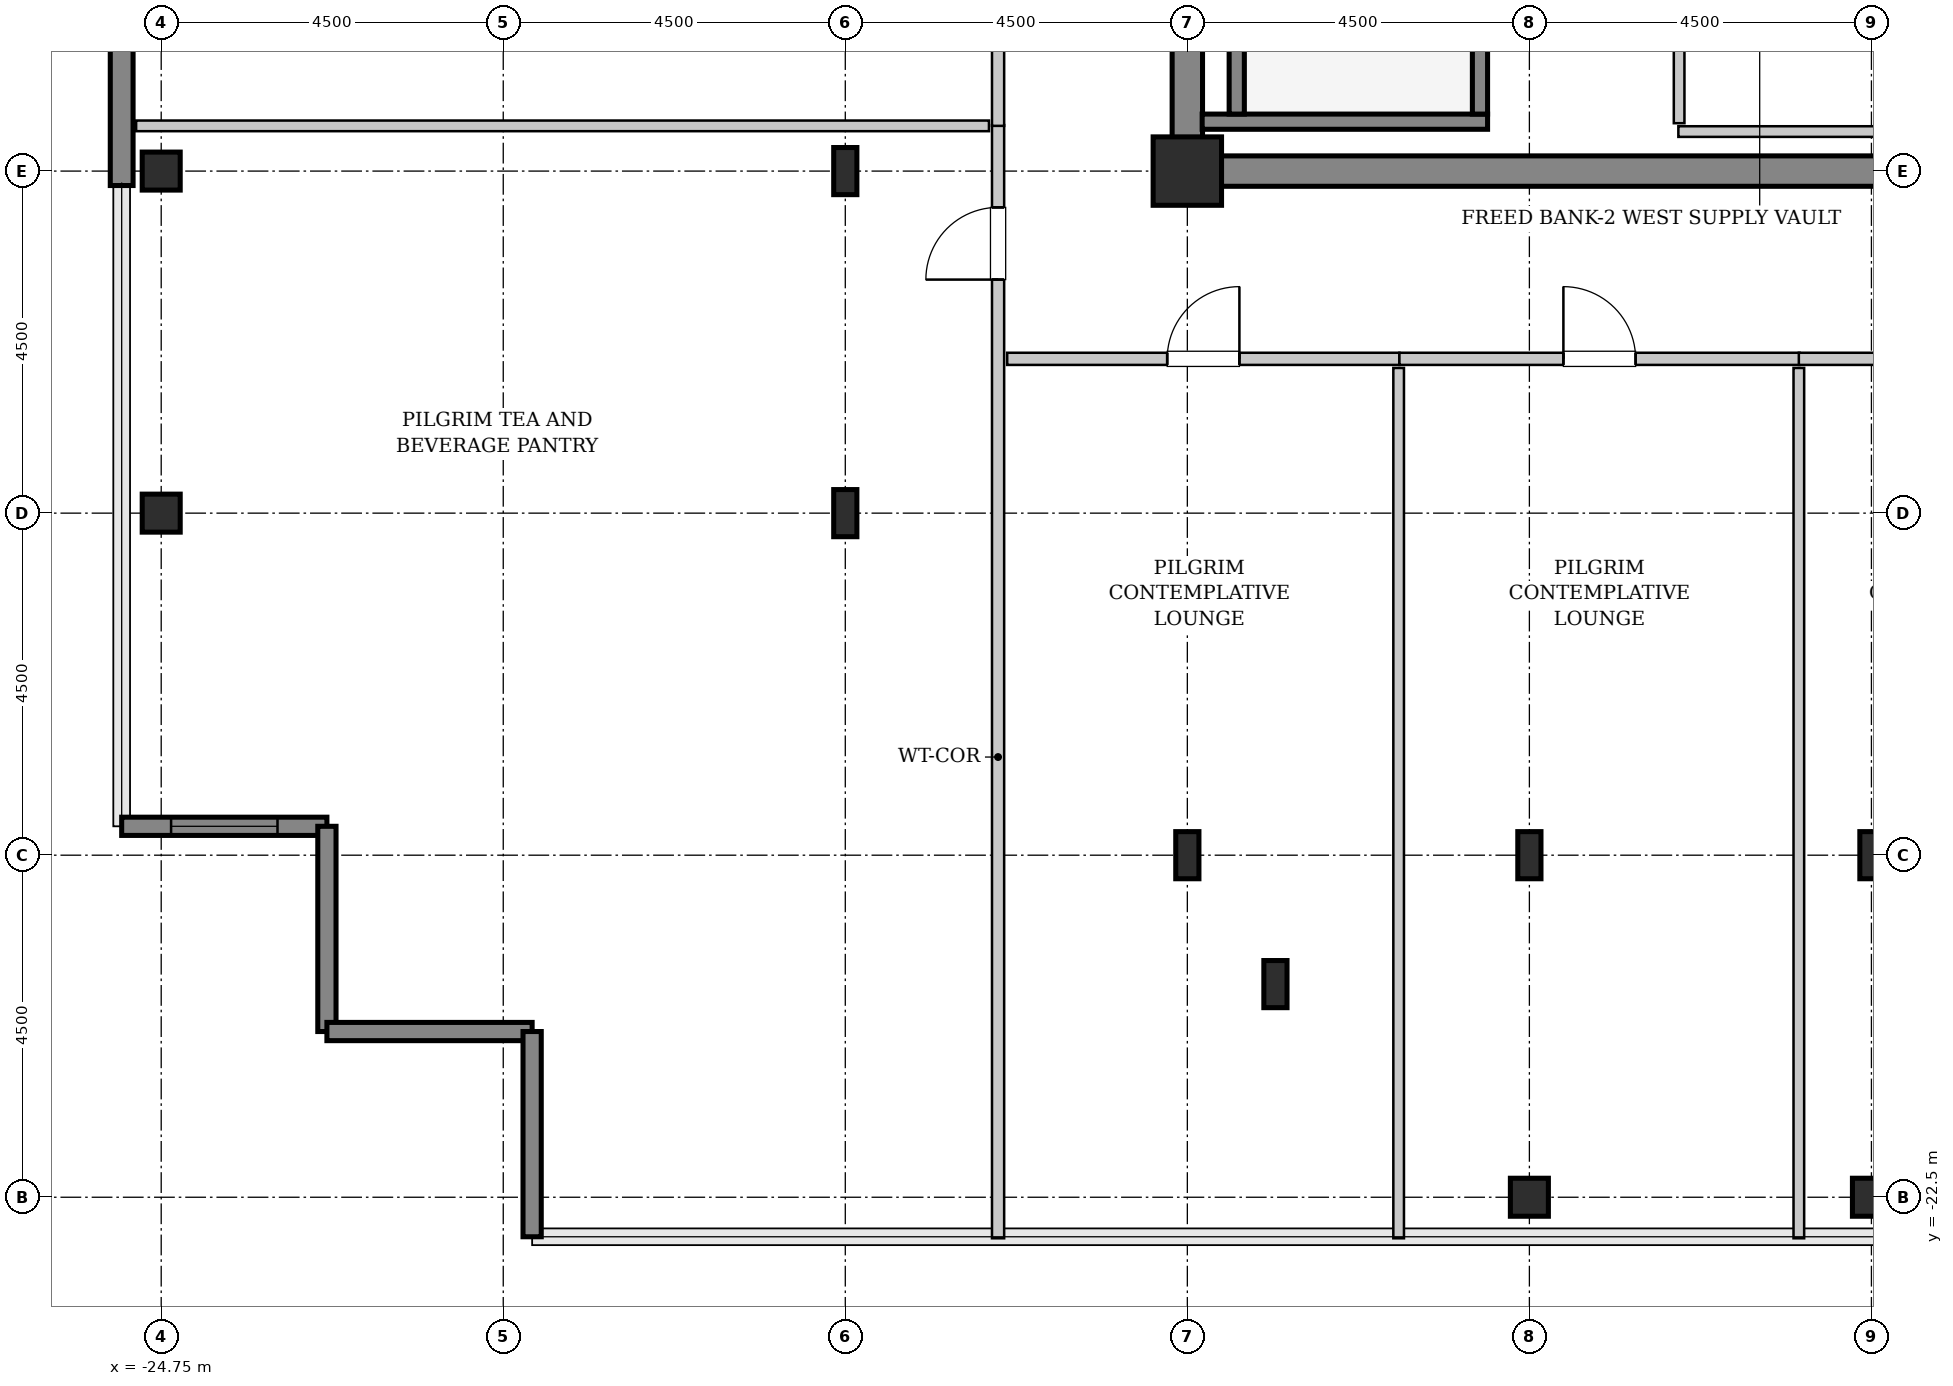
"""IFC4 building model, lengths in metres.
Left out: names, types, materials, properties, quantities, classifications, styles, units other than length and angle.
Written with IfcOpenShell. Run it as: python <this file> out.ifc"""

import sys

from ifc_helpers import new_model, si_unit, direction, frame, frame_2d, origin, origin_2d, place, context, subcontext, project, spatial, rectangle, hollow_rectangle, i_section, extrude, source, transform, mapped, element, fill, save


model = new_model("IFC4")
c1 = context("Model", 3, precision=1e-05, world=origin(), true_north=direction((0.0, 1.0)))
c2 = subcontext(c1, "Body", "Model", "MODEL_VIEW")
j1 = project(units=[si_unit("LENGTHUNIT", "METRE"), si_unit("PLANEANGLEUNIT", "RADIAN")], contexts=[c1])
p1 = place(None, origin())
s1 = spatial("IfcSite", under=j1, at=p1, CompositionType="ELEMENT")
p2 = place(p1, origin())
s2 = spatial("IfcBuilding", under=s1, at=p2, CompositionType="ELEMENT")
p3 = place(p2, frame((0.0, 0.0, 322.4)))
s3 = spatial("IfcBuildingStorey", under=s2, at=p3, CompositionType="ELEMENT", Elevation=322.4)
m1 = source(origin(), c2, "Body", "SweptSolid", [
    extrude(rectangle(XDim=9.9, YDim=0.4, at=frame_2d((4.95, 0.0))), origin(), (0.0, 0.0, 1.0), 3.8),
])
p4 = place(p3, frame((-11.45, -9.0, 0.0), z_axis=(0.0, 0.0, 1.0), x_axis=(1.0, 0.0, 0.0)))
e1 = element("IfcWall", 1, at=p4, inside=s3, PredefinedType="SHEAR", context=c2, shape_type="MappedRepresentation", body=[
    mapped(m1, transform((0.0, 0.0, 0.0), x_axis=(1.0, 0.0, 0.0), y_axis=(0.0, 1.0, 0.0), z_axis=(0.0, 0.0, 1.0), scale=1.0)),
])
m2 = source(origin(), c2, "Body", "SweptSolid", [
    extrude(rectangle(XDim=7.45, YDim=0.4, at=frame_2d((3.725, 0.0))), origin(), (0.0, 0.0, 1.0), 3.8),
])
p5 = place(p3, frame((-11.25, -8.8, 0.0), z_axis=(0.0, 0.0, 1.0), x_axis=(0.0, 1.0, 0.0)))
e2 = element("IfcWall", 2, at=p5, inside=s3, PredefinedType="SHEAR", context=c2, shape_type="MappedRepresentation", body=[
    mapped(m2, transform((0.0, 0.0, 0.0), x_axis=(1.0, 0.0, 0.0), y_axis=(0.0, 1.0, 0.0), z_axis=(0.0, 0.0, 1.0), scale=1.0)),
])
m3 = source(origin(), c2, "Body", "SweptSolid", [
    extrude(hollow_rectangle(XDim=0.5, YDim=0.5, WallThickness=0.025, InnerFilletRadius=0.025, OuterFilletRadius=0.05, at=origin_2d()), origin(), (0.0, 0.0, 1.0), 3.8),
])
for number, where, z_axis, x_axis in (
    (3, (-24.75, -13.5, 0.0), (0.0, 0.0, 1.0), (1.0, 0.0, 0.0)),
    (4, (-24.75, -9.0, 0.0), (0.0, 0.0, 1.0), (1.0, 0.0, 0.0)),
):
    element("IfcColumn", number, at=place(p3, frame(where, z_axis=z_axis, x_axis=x_axis)), inside=s3, PredefinedType="COLUMN", context=c2, shape_type="MappedRepresentation", body=[
        mapped(m3, transform((0.0, 0.0, 0.0), x_axis=(1.0, 0.0, 0.0), y_axis=(0.0, 1.0, 0.0), z_axis=(0.0, 0.0, 1.0), scale=1.0)),
    ])
m4 = source(origin(), c2, "Body", "SweptSolid", [
    extrude(i_section(OverallWidth=0.305, OverallDepth=0.62, WebThickness=0.021, FlangeThickness=0.04, FilletRadius=0.027, at=origin_2d()), origin(), (0.0, 0.0, 1.0), 3.8),
])
for number, where, z_axis, x_axis in (
    (5, (-15.75, -13.5, 0.0), (0.0, 0.0, 1.0), (1.0, 0.0, 0.0)),
    (6, (-15.75, -9.0, 0.0), (0.0, 0.0, 1.0), (1.0, 0.0, 0.0)),
    (7, (-11.25, -18.0, 0.0), (0.0, 0.0, 1.0), (1.0, 0.0, 0.0)),
):
    element("IfcColumn", number, at=place(p3, frame(where, z_axis=z_axis, x_axis=x_axis)), inside=s3, PredefinedType="COLUMN", context=c2, shape_type="MappedRepresentation", body=[
        mapped(m4, transform((0.0, 0.0, 0.0), x_axis=(1.0, 0.0, 0.0), y_axis=(0.0, 1.0, 0.0), z_axis=(0.0, 0.0, 1.0), scale=1.0)),
    ])
m5 = source(origin(), c2, "Body", "SweptSolid", [
    extrude(rectangle(XDim=0.9, YDim=0.9, at=origin_2d()), origin(), (0.0, 0.0, 1.0), 3.8),
])
p6 = place(p3, frame((-11.25, -9.0, 0.0), z_axis=(0.0, 0.0, 1.0), x_axis=(1.0, 0.0, 0.0)))
e8 = element("IfcColumn", 8, at=p6, inside=s3, PredefinedType="COLUMN", context=c2, shape_type="MappedRepresentation", body=[
    mapped(m5, transform((0.0, 0.0, 0.0), x_axis=(1.0, 0.0, 0.0), y_axis=(0.0, 1.0, 0.0), z_axis=(0.0, 0.0, 1.0), scale=1.0)),
])
p7 = place(p3, frame((-10.091, -19.696, 0.0), z_axis=(0.0, 0.0, 1.0), x_axis=(1.0, 0.0, 0.0)))
e9 = element("IfcColumn", 9, at=p7, inside=s3, PredefinedType="COLUMN", context=c2, shape_type="MappedRepresentation", body=[
    mapped(m4, transform((0.0, 0.0, 0.0), x_axis=(1.0, 0.0, 0.0), y_axis=(0.0, 1.0, 0.0), z_axis=(0.0, 0.0, 1.0), scale=1.0)),
])
p8 = place(p3, frame((-6.75, -22.5, 0.0), z_axis=(0.0, 0.0, 1.0), x_axis=(1.0, 0.0, 0.0)))
e10 = element("IfcColumn", 10, at=p8, inside=s3, PredefinedType="COLUMN", context=c2, shape_type="MappedRepresentation", body=[
    mapped(m3, transform((0.0, 0.0, 0.0), x_axis=(1.0, 0.0, 0.0), y_axis=(0.0, 1.0, 0.0), z_axis=(0.0, 0.0, 1.0), scale=1.0)),
])
p9 = place(p3, frame((-6.75, -18.0, 0.0), z_axis=(0.0, 0.0, 1.0), x_axis=(1.0, 0.0, 0.0)))
e11 = element("IfcColumn", 11, at=p9, inside=s3, PredefinedType="COLUMN", context=c2, shape_type="MappedRepresentation", body=[
    mapped(m4, transform((0.0, 0.0, 0.0), x_axis=(1.0, 0.0, 0.0), y_axis=(0.0, 1.0, 0.0), z_axis=(0.0, 0.0, 1.0), scale=1.0)),
])
p10 = place(p3, frame((-2.25, -22.5, 0.0), z_axis=(0.0, 0.0, 1.0), x_axis=(1.0, 0.0, 0.0)))
e12 = element("IfcColumn", 12, at=p10, inside=s3, PredefinedType="COLUMN", context=c2, shape_type="MappedRepresentation", body=[
    mapped(m3, transform((0.0, 0.0, 0.0), x_axis=(1.0, 0.0, 0.0), y_axis=(0.0, 1.0, 0.0), z_axis=(0.0, 0.0, 1.0), scale=1.0)),
])
p11 = place(p3, frame((-2.25, -18.0, 0.0), z_axis=(0.0, 0.0, 1.0), x_axis=(1.0, 0.0, 0.0)))
e13 = element("IfcColumn", 13, at=p11, inside=s3, PredefinedType="COLUMN", context=c2, shape_type="MappedRepresentation", body=[
    mapped(m4, transform((0.0, 0.0, 0.0), x_axis=(1.0, 0.0, 0.0), y_axis=(0.0, 1.0, 0.0), z_axis=(0.0, 0.0, 1.0), scale=1.0)),
])
m6 = source(origin(), c2, "Body", "SweptSolid", [
    extrude(rectangle(XDim=4.88, YDim=0.3, at=frame_2d((2.44, 0.0))), origin(), (0.0, 0.0, 1.0), 3.55),
])
p12 = place(p3, frame((-25.27, -9.19, 0.0), z_axis=(0.0, 0.0, 1.0), x_axis=(0.0, 1.0, 0.0)))
e14 = element("IfcWall", 14, at=p12, inside=s3, PredefinedType="SHEAR", context=c2, shape_type="MappedRepresentation", body=[
    mapped(m6, transform((0.0, 0.0, 0.0), x_axis=(1.0, 0.0, 0.0), y_axis=(0.0, 1.0, 0.0), z_axis=(0.0, 0.0, 1.0), scale=1.0)),
])
m7 = source(origin(), c2, "Body", "SweptSolid", [
    extrude(rectangle(XDim=2.7, YDim=0.24, at=frame_2d((1.35, 0.0))), origin(), (0.0, 0.0, 1.0), 3.55),
])
p13 = place(p3, frame((-25.27, -17.62, 0.0), z_axis=(0.0, 0.0, 1.0), x_axis=(1.0, 0.0, 0.0)))
e15 = element("IfcWall", 15, at=p13, inside=s3, PredefinedType="SHEAR", context=c2, shape_type="MappedRepresentation", body=[
    mapped(m7, transform((0.0, 0.0, 0.0), x_axis=(1.0, 0.0, 0.0), y_axis=(0.0, 1.0, 0.0), z_axis=(0.0, 0.0, 1.0), scale=1.0)),
])
p14 = place(p13, frame((0.65, 0.0, 0.85)))
e16 = element("IfcOpeningElement", 16, at=p14, cuts=e15, PredefinedType="OPENING", context=c2, shape_type="SweptSolid", body=[
    extrude(rectangle(XDim=1.4, YDim=1.8, at=frame_2d((0.7, 0.9))), frame((0.0, 0.13, 0.0), z_axis=(0.0, -1.0, 0.0), x_axis=(1.0, 0.0, 0.0)), (0.0, 0.0, 1.0), 0.26),
])
for number, where, z_axis, x_axis in (
    (17, (-22.57, -17.62, 0.0), (0.0, 0.0, 1.0), (0.0, -1.0, 0.0)),
    (18, (-22.57, -20.32, 0.0), (0.0, 0.0, 1.0), (1.0, 0.0, 0.0)),
    (19, (-19.87, -20.32, 0.0), (0.0, 0.0, 1.0), (0.0, -1.0, 0.0)),
):
    element("IfcWall", number, at=place(p3, frame(where, z_axis=z_axis, x_axis=x_axis)), inside=s3, PredefinedType="SHEAR", context=c2, shape_type="MappedRepresentation", body=[
        mapped(m7, transform((0.0, 0.0, 0.0), x_axis=(1.0, 0.0, 0.0), y_axis=(0.0, 1.0, 0.0), z_axis=(0.0, 0.0, 1.0), scale=1.0)),
    ])
m8 = source(origin(), c2, "Body", "SweptSolid", [
    extrude(rectangle(XDim=3.755, YDim=0.2, at=frame_2d((1.877, 0.0))), origin(), (0.0, 0.0, 1.0), 3.8),
])
p15 = place(p3, frame((-11.055, -8.35, 0.0), z_axis=(0.0, 0.0, 1.0), x_axis=(1.0, 0.0, 0.0)))
e20 = element("IfcWall", 20, at=p15, inside=s3, PredefinedType="SOLIDWALL", context=c2, shape_type="MappedRepresentation", body=[
    mapped(m8, transform((0.0, 0.0, 0.0), x_axis=(1.0, 0.0, 0.0), y_axis=(0.0, 1.0, 0.0), z_axis=(0.0, 0.0, 1.0), scale=1.0)),
])
m9 = source(origin(), c2, "Body", "SweptSolid", [
    extrude(rectangle(XDim=7.1, YDim=0.2, at=frame_2d((3.55, 0.0))), origin(), (0.0, 0.0, 1.0), 3.8),
])
p16 = place(p3, frame((-10.6, -1.15, 0.0), z_axis=(0.0, 0.0, 1.0), x_axis=(0.0, -1.0, 0.0)))
e21 = element("IfcWall", 21, at=p16, inside=s3, PredefinedType="SOLIDWALL", context=c2, shape_type="MappedRepresentation", body=[
    mapped(m9, transform((0.0, 0.0, 0.0), x_axis=(1.0, 0.0, 0.0), y_axis=(0.0, 1.0, 0.0), z_axis=(0.0, 0.0, 1.0), scale=1.0)),
])
p17 = place(p3, frame((-7.4, -1.15, 0.0), z_axis=(0.0, 0.0, 1.0), x_axis=(0.0, -1.0, 0.0)))
e22 = element("IfcWall", 22, at=p17, inside=s3, PredefinedType="SOLIDWALL", context=c2, shape_type="MappedRepresentation", body=[
    mapped(m9, transform((0.0, 0.0, 0.0), x_axis=(1.0, 0.0, 0.0), y_axis=(0.0, 1.0, 0.0), z_axis=(0.0, 0.0, 1.0), scale=1.0)),
])
p18 = place(p17, frame((0.18, 0.0, 0.0)))
e23 = element("IfcOpeningElement", 23, at=p18, cuts=e22, PredefinedType="OPENING", context=c2, shape_type="SweptSolid", body=[
    extrude(rectangle(XDim=1.1, YDim=2.15, at=frame_2d((0.55, 1.075))), frame((0.0, 0.11, 0.0), z_axis=(0.0, -1.0, 0.0), x_axis=(1.0, 0.0, 0.0)), (0.0, 0.0, 1.0), 0.22),
])
m10 = source(origin(), c2, "Body", "SweptSolid", [
    extrude(rectangle(XDim=3.15, YDim=0.14, at=frame_2d((1.575, 0.0))), origin(), (0.0, 0.0, 1.0), 3.535),
])
p19 = place(p3, frame((-4.79, -8.48, 0.0), z_axis=(0.0, 0.0, 1.0), x_axis=(1.0, 0.0, 0.0)))
e24 = element("IfcWall", 24, at=p19, inside=s3, PredefinedType="PARTITIONING", context=c2, shape_type="MappedRepresentation", body=[
    mapped(m10, transform((0.0, 0.0, 0.0), x_axis=(1.0, 0.0, 0.0), y_axis=(0.0, 1.0, 0.0), z_axis=(0.0, 0.0, 1.0), scale=1.0)),
])
m11 = source(origin(), c2, "Body", "SweptSolid", [
    extrude(rectangle(XDim=2.38, YDim=0.14, at=frame_2d((1.19, 0.0))), origin(), (0.0, 0.0, 1.0), 3.535),
])
p20 = place(p3, frame((-4.78, -8.37, 0.0), z_axis=(0.0, 0.0, 1.0), x_axis=(0.0, 1.0, 0.0)))
e25 = element("IfcWall", 25, at=p20, inside=s3, PredefinedType="PARTITIONING", context=c2, shape_type="MappedRepresentation", body=[
    mapped(m11, transform((0.0, 0.0, 0.0), x_axis=(1.0, 0.0, 0.0), y_axis=(0.0, 1.0, 0.0), z_axis=(0.0, 0.0, 1.0), scale=1.0)),
])
m12 = source(origin(), c2, "Body", "SweptSolid", [
    extrude(rectangle(XDim=14.645, YDim=0.16, at=frame_2d((7.323, 0.0))), origin(), (0.0, 0.0, 1.0), 3.535),
])
p21 = place(p3, frame((-13.74, -23.04, 0.0), z_axis=(0.0, 0.0, 1.0), x_axis=(0.0, 1.0, 0.0)))
e26 = element("IfcWall", 26, at=p21, inside=s3, PredefinedType="PARTITIONING", context=c2, shape_type="MappedRepresentation", body=[
    mapped(m12, transform((0.0, 0.0, 0.0), x_axis=(1.0, 0.0, 0.0), y_axis=(0.0, 1.0, 0.0), z_axis=(0.0, 0.0, 1.0), scale=1.0)),
])
p22 = place(p21, frame((12.613, 0.0, 0.0)))
e27 = element("IfcOpeningElement", 27, at=p22, cuts=e26, PredefinedType="OPENING", context=c2, shape_type="SweptSolid", body=[
    extrude(rectangle(XDim=0.95, YDim=2.1, at=frame_2d((0.475, 1.05))), frame((0.0, 0.09, 0.0), z_axis=(0.0, -1.0, 0.0), x_axis=(1.0, 0.0, 0.0)), (0.0, 0.0, 1.0), 0.18),
])
m13 = source(origin(), c2, "Body", "SweptSolid", [
    extrude(rectangle(XDim=11.22, YDim=0.14, at=frame_2d((5.61, 0.0))), origin(), (0.0, 0.0, 1.0), 3.535),
])
p23 = place(p3, frame((-25.08, -8.405, 0.0), z_axis=(0.0, 0.0, 1.0), x_axis=(1.0, 0.0, 0.0)))
e28 = element("IfcWall", 28, at=p23, inside=s3, PredefinedType="PARTITIONING", context=c2, shape_type="MappedRepresentation", body=[
    mapped(m13, transform((0.0, 0.0, 0.0), x_axis=(1.0, 0.0, 0.0), y_axis=(0.0, 1.0, 0.0), z_axis=(0.0, 0.0, 1.0), scale=1.0)),
])
m14 = source(origin(), c2, "Body", "SweptSolid", [
    extrude(rectangle(XDim=6.41, YDim=0.16, at=frame_2d((3.205, 0.0))), origin(), (0.0, 0.0, 1.0), 3.535),
])
p24 = place(p3, frame((-13.74, -8.405, 0.0), z_axis=(0.0, 0.0, 1.0), x_axis=(0.0, 1.0, 0.0)))
e29 = element("IfcWall", 29, at=p24, inside=s3, PredefinedType="PARTITIONING", context=c2, shape_type="MappedRepresentation", body=[
    mapped(m14, transform((0.0, 0.0, 0.0), x_axis=(1.0, 0.0, 0.0), y_axis=(0.0, 1.0, 0.0), z_axis=(0.0, 0.0, 1.0), scale=1.0)),
])
p25 = place(p24, frame((2.73, 0.0, 0.0)))
e30 = element("IfcOpeningElement", 30, at=p25, cuts=e29, PredefinedType="OPENING", context=c2, shape_type="SweptSolid", body=[
    extrude(rectangle(XDim=0.95, YDim=2.1, at=frame_2d((0.475, 1.05))), frame((0.0, 0.09, 0.0), z_axis=(0.0, -1.0, 0.0), x_axis=(1.0, 0.0, 0.0)), (0.0, 0.0, 1.0), 0.18),
])
m15 = source(origin(), c2, "Body", "SweptSolid", [
    extrude(rectangle(XDim=5.16, YDim=0.16, at=frame_2d((2.58, 0.0))), origin(), (0.0, 0.0, 1.0), 3.535),
])
p26 = place(p3, frame((-13.62, -11.47, 0.0), z_axis=(0.0, 0.0, 1.0), x_axis=(1.0, 0.0, 0.0)))
e31 = element("IfcWall", 31, at=p26, inside=s3, PredefinedType="PARTITIONING", context=c2, shape_type="MappedRepresentation", body=[
    mapped(m15, transform((0.0, 0.0, 0.0), x_axis=(1.0, 0.0, 0.0), y_axis=(0.0, 1.0, 0.0), z_axis=(0.0, 0.0, 1.0), scale=1.0)),
])
p27 = place(p26, frame((2.105, 0.0, 0.0)))
e32 = element("IfcOpeningElement", 32, at=p27, cuts=e31, PredefinedType="OPENING", context=c2, shape_type="SweptSolid", body=[
    extrude(rectangle(XDim=0.95, YDim=2.1, at=frame_2d((0.475, 1.05))), frame((0.0, 0.09, 0.0), z_axis=(0.0, -1.0, 0.0), x_axis=(1.0, 0.0, 0.0)), (0.0, 0.0, 1.0), 0.18),
])
m16 = source(origin(), c2, "Body", "SweptSolid", [
    extrude(rectangle(XDim=11.45, YDim=0.14, at=frame_2d((5.725, 0.0))), origin(), (0.0, 0.0, 1.0), 3.535),
])
p28 = place(p3, frame((-8.47, -23.04, 0.0), z_axis=(0.0, 0.0, 1.0), x_axis=(0.0, 1.0, 0.0)))
e33 = element("IfcWall", 33, at=p28, inside=s3, PredefinedType="PARTITIONING", context=c2, shape_type="MappedRepresentation", body=[
    mapped(m16, transform((0.0, 0.0, 0.0), x_axis=(1.0, 0.0, 0.0), y_axis=(0.0, 1.0, 0.0), z_axis=(0.0, 0.0, 1.0), scale=1.0)),
])
m17 = source(origin(), c2, "Body", "SweptSolid", [
    extrude(rectangle(XDim=5.265, YDim=0.16, at=frame_2d((2.632, 0.0))), origin(), (0.0, 0.0, 1.0), 3.535),
])
p29 = place(p3, frame((-8.46, -11.47, 0.0), z_axis=(0.0, 0.0, 1.0), x_axis=(1.0, 0.0, 0.0)))
e34 = element("IfcWall", 34, at=p29, inside=s3, PredefinedType="PARTITIONING", context=c2, shape_type="MappedRepresentation", body=[
    mapped(m17, transform((0.0, 0.0, 0.0), x_axis=(1.0, 0.0, 0.0), y_axis=(0.0, 1.0, 0.0), z_axis=(0.0, 0.0, 1.0), scale=1.0)),
])
p30 = place(p29, frame((2.157, 0.0, 0.0)))
e35 = element("IfcOpeningElement", 35, at=p30, cuts=e34, PredefinedType="OPENING", context=c2, shape_type="SweptSolid", body=[
    extrude(rectangle(XDim=0.95, YDim=2.1, at=frame_2d((0.475, 1.05))), frame((0.0, 0.09, 0.0), z_axis=(0.0, -1.0, 0.0), x_axis=(1.0, 0.0, 0.0)), (0.0, 0.0, 1.0), 0.18),
])
p31 = place(p3, frame((-3.205, -23.04, 0.0), z_axis=(0.0, 0.0, 1.0), x_axis=(0.0, 1.0, 0.0)))
e36 = element("IfcWall", 36, at=p31, inside=s3, PredefinedType="PARTITIONING", context=c2, shape_type="MappedRepresentation", body=[
    mapped(m16, transform((0.0, 0.0, 0.0), x_axis=(1.0, 0.0, 0.0), y_axis=(0.0, 1.0, 0.0), z_axis=(0.0, 0.0, 1.0), scale=1.0)),
])
m18 = source(origin(), c2, "Body", "SweptSolid", [
    extrude(rectangle(XDim=4.233, YDim=0.16, at=frame_2d((2.116, 0.0))), origin(), (0.0, 0.0, 1.0), 3.535),
])
p32 = place(p3, frame((-3.205, -11.47, 0.0), z_axis=(0.0, 0.0, 1.0), x_axis=(1.0, 0.0, 0.0)))
e37 = element("IfcWall", 37, at=p32, inside=s3, PredefinedType="PARTITIONING", context=c2, shape_type="MappedRepresentation", body=[
    mapped(m18, transform((0.0, 0.0, 0.0), x_axis=(1.0, 0.0, 0.0), y_axis=(0.0, 1.0, 0.0), z_axis=(0.0, 0.0, 1.0), scale=1.0)),
])
p33 = place(p32, frame((1.641, 0.0, 0.0)))
e38 = element("IfcOpeningElement", 38, at=p33, cuts=e37, PredefinedType="OPENING", context=c2, shape_type="SweptSolid", body=[
    extrude(rectangle(XDim=0.95, YDim=2.1, at=frame_2d((0.475, 1.05))), frame((0.0, 0.09, 0.0), z_axis=(0.0, -1.0, 0.0), x_axis=(1.0, 0.0, 0.0)), (0.0, 0.0, 1.0), 0.18),
])
m19 = source(origin(), c2, "Body", "SweptSolid", [
    extrude(rectangle(XDim=1.4, YDim=1.8, at=frame_2d((0.7, 0.9))), frame((0.0, 0.03, 0.0), z_axis=(0.0, -1.0, 0.0), x_axis=(1.0, 0.0, 0.0)), (0.0, 0.0, 1.0), 0.06),
])
p34 = place(p14, origin())
e39 = element("IfcWindow", 39, at=p34, inside=s3, PartitioningType="SINGLE_PANEL", PredefinedType="WINDOW", context=c2, shape_type="MappedRepresentation", body=[
    mapped(m19, transform((0.0, 0.0, 0.0), x_axis=(1.0, 0.0, 0.0), y_axis=(0.0, 1.0, 0.0), z_axis=(0.0, 0.0, 1.0), scale=1.0)),
])
fill(e16, e39)
m20 = source(origin(), c2, "Body", "SweptSolid", [
    extrude(rectangle(XDim=0.95, YDim=2.1, at=frame_2d((0.475, 1.05))), frame((0.0, 0.025, 0.0), z_axis=(0.0, -1.0, 0.0), x_axis=(1.0, 0.0, 0.0)), (0.0, 0.0, 1.0), 0.05),
])
p35 = place(p22, origin())
e40 = element("IfcDoor", 40, at=p35, inside=s3, OperationType="SINGLE_SWING_LEFT", PredefinedType="DOOR", context=c2, shape_type="MappedRepresentation", body=[
    mapped(m20, transform((0.0, 0.0, 0.0), x_axis=(1.0, 0.0, 0.0), y_axis=(0.0, 1.0, 0.0), z_axis=(0.0, 0.0, 1.0), scale=1.0)),
])
fill(e27, e40)
p36 = place(p27, origin())
e41 = element("IfcDoor", 41, at=p36, inside=s3, OperationType="SINGLE_SWING_RIGHT", PredefinedType="DOOR", context=c2, shape_type="MappedRepresentation", body=[
    mapped(m20, transform((0.0, 0.0, 0.0), x_axis=(1.0, 0.0, 0.0), y_axis=(0.0, 1.0, 0.0), z_axis=(0.0, 0.0, 1.0), scale=1.0)),
])
fill(e32, e41)
p37 = place(p30, origin())
e42 = element("IfcDoor", 42, at=p37, inside=s3, OperationType="SINGLE_SWING_LEFT", PredefinedType="DOOR", context=c2, shape_type="MappedRepresentation", body=[
    mapped(m20, transform((0.0, 0.0, 0.0), x_axis=(1.0, 0.0, 0.0), y_axis=(0.0, 1.0, 0.0), z_axis=(0.0, 0.0, 1.0), scale=1.0)),
])
fill(e35, e42)
save(model, sys.argv[1])
